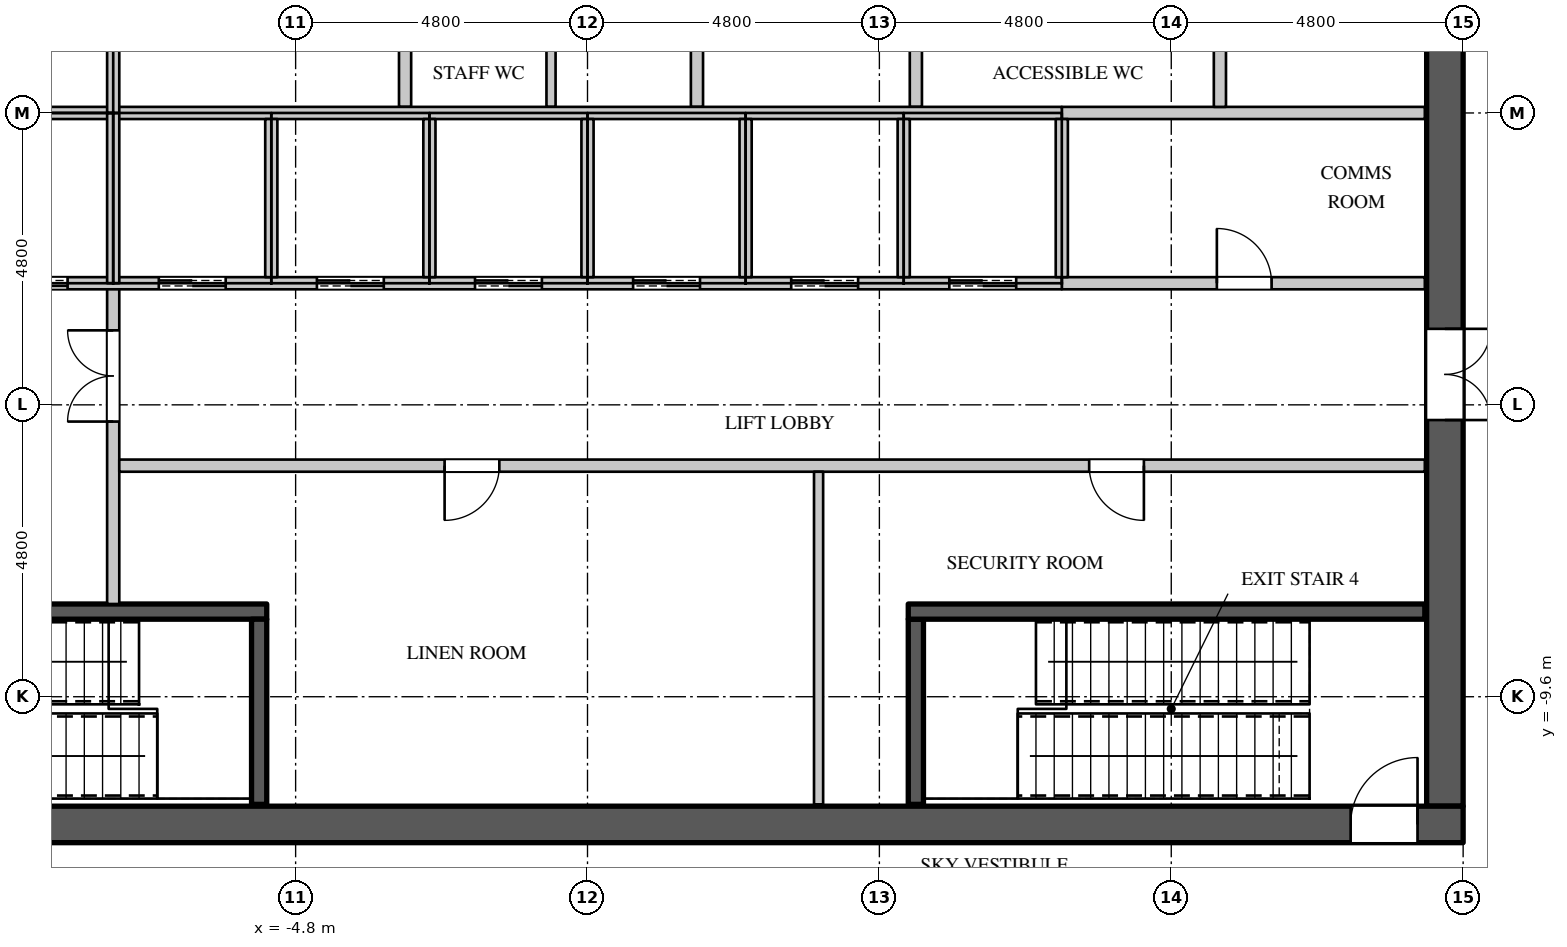
"""IFC4 building model, lengths in metres.
Left out: names, types, materials, properties, quantities, classifications, styles, units other than length and angle.
Written with IfcOpenShell. Run it as: python <this file> out.ifc"""

import sys

from ifc_helpers import new_model, si_unit, direction, frame, frame_2d, origin, place, context, subcontext, project, spatial, rectangle, extrude, element, fill, save


model = new_model("IFC4")
c1 = context("Model", 3, precision=1e-05, world=origin(), true_north=direction((0.0, 1.0)))
c2 = subcontext(c1, "Body", "Model", "MODEL_VIEW")
j1 = project(units=[si_unit("LENGTHUNIT", "METRE"), si_unit("PLANEANGLEUNIT", "RADIAN")], contexts=[c1])
p1 = place(None, origin())
s1 = spatial("IfcSite", under=j1, at=p1, CompositionType="ELEMENT")
p2 = place(p1, origin())
s2 = spatial("IfcBuilding", under=s1, at=p2, CompositionType="ELEMENT")
p3 = place(p2, frame((0.0, 0.0, 314.7)))
s3 = spatial("IfcBuildingStorey", under=s2, at=p3, CompositionType="ELEMENT", Elevation=314.7)
p4 = place(p3, frame((-14.4, -11.7, 0.0), z_axis=(0.0, 0.0, 1.0), x_axis=(1.0, 0.0, 0.0)))
e1 = element("IfcWall", 1, at=p4, inside=s3, PredefinedType="SHEAR", context=c2, shape_type="SweptSolid", body=[
    extrude(rectangle(XDim=28.8, YDim=0.6, at=frame_2d((14.4, 0.0))), origin(), (0.0, 0.0, 1.0), 5.4),
])
p5 = place(p4, frame((0.75, 0.0, 0.0)))
e2 = element("IfcOpeningElement", 2, at=p5, cuts=e1, PredefinedType="OPENING", context=c2, shape_type="SweptSolid", body=[
    extrude(rectangle(XDim=1.1, YDim=2.2, at=frame_2d((0.55, 1.1))), frame((0.0, 0.31, 0.0), z_axis=(0.0, -1.0, 0.0), x_axis=(1.0, 0.0, 0.0)), (0.0, 0.0, 1.0), 0.62),
])
p6 = place(p4, frame((26.95, 0.0, 0.0)))
e3 = element("IfcOpeningElement", 3, at=p6, cuts=e1, PredefinedType="OPENING", context=c2, shape_type="SweptSolid", body=[
    extrude(rectangle(XDim=1.1, YDim=2.2, at=frame_2d((0.55, 1.1))), frame((0.0, 0.31, 0.0), z_axis=(0.0, -1.0, 0.0), x_axis=(1.0, 0.0, 0.0)), (0.0, 0.0, 1.0), 0.62),
])
p7 = place(p3, frame((14.1, -11.4, 0.0), z_axis=(0.0, 0.0, 1.0), x_axis=(0.0, 1.0, 0.0)))
e4 = element("IfcWall", 4, at=p7, inside=s3, PredefinedType="SHEAR", context=c2, shape_type="SweptSolid", body=[
    extrude(rectangle(XDim=22.8, YDim=0.6, at=frame_2d((11.4, 0.0))), origin(), (0.0, 0.0, 1.0), 5.4),
])
p8 = place(p7, frame((6.35, 0.0, 0.0)))
e5 = element("IfcOpeningElement", 5, at=p8, cuts=e4, PredefinedType="OPENING", context=c2, shape_type="SweptSolid", body=[
    extrude(rectangle(XDim=1.5, YDim=2.4, at=frame_2d((0.75, 1.2))), frame((0.0, 0.31, 0.0), z_axis=(0.0, -1.0, 0.0), x_axis=(1.0, 0.0, 0.0)), (0.0, 0.0, 1.0), 0.62),
])
p9 = place(p3, frame((-7.8, -8.075, 0.0), z_axis=(0.0, 0.0, 1.0), x_axis=(0.0, 1.0, 0.0)))
e6 = element("IfcWall", 6, at=p9, inside=s3, PredefinedType="PARTITIONING", context=c2, shape_type="SweptSolid", body=[
    extrude(rectangle(XDim=5.275, YDim=0.2, at=frame_2d((2.637, 0.0))), origin(), (0.0, 0.0, 1.0), 5.1),
])
p10 = place(p9, frame((3.0, 0.0, 0.0)))
e7 = element("IfcOpeningElement", 7, at=p10, cuts=e6, PredefinedType="OPENING", context=c2, shape_type="SweptSolid", body=[
    extrude(rectangle(XDim=1.5, YDim=2.4, at=frame_2d((0.75, 1.2))), frame((0.0, 0.11, 0.0), z_axis=(0.0, -1.0, 0.0), x_axis=(1.0, 0.0, 0.0)), (0.0, 0.0, 1.0), 0.22),
])
p11 = place(p3, frame((-7.7, -5.8, 0.0), z_axis=(0.0, 0.0, 1.0), x_axis=(1.0, 0.0, 0.0)))
e8 = element("IfcWall", 8, at=p11, inside=s3, PredefinedType="PARTITIONING", context=c2, shape_type="SweptSolid", body=[
    extrude(rectangle(XDim=21.47, YDim=0.2, at=frame_2d((10.735, 0.0))), origin(), (0.0, 0.0, 1.0), 5.1),
])
p12 = place(p11, frame((5.35, 0.0, 0.0)))
e9 = element("IfcOpeningElement", 9, at=p12, cuts=e8, PredefinedType="OPENING", context=c2, shape_type="SweptSolid", body=[
    extrude(rectangle(XDim=0.9, YDim=2.2, at=frame_2d((0.45, 1.1))), frame((0.0, 0.11, 0.0), z_axis=(0.0, -1.0, 0.0), x_axis=(1.0, 0.0, 0.0)), (0.0, 0.0, 1.0), 0.22),
])
p13 = place(p11, frame((15.95, 0.0, 0.0)))
e10 = element("IfcOpeningElement", 10, at=p13, cuts=e8, PredefinedType="OPENING", context=c2, shape_type="SweptSolid", body=[
    extrude(rectangle(XDim=0.9, YDim=2.2, at=frame_2d((0.45, 1.1))), frame((0.0, 0.11, 0.0), z_axis=(0.0, -1.0, 0.0), x_axis=(1.0, 0.0, 0.0)), (0.0, 0.0, 1.0), 0.22),
])
p14 = place(p3, frame((-0.6, 0.1, 0.0), z_axis=(0.0, 0.0, 1.0), x_axis=(0.0, 1.0, 0.0)))
e11 = element("IfcWall", 11, at=p14, inside=s3, PredefinedType="PARTITIONING", context=c2, shape_type="SweptSolid", body=[
    extrude(rectangle(XDim=2.6, YDim=0.15, at=frame_2d((1.3, 0.0))), origin(), (0.0, 0.0, 1.0), 5.1),
])
p15 = place(p3, frame((3.8, -11.37, 0.0), z_axis=(0.0, 0.0, 1.0), x_axis=(0.0, 1.0, 0.0)))
e12 = element("IfcWall", 12, at=p15, inside=s3, PredefinedType="PARTITIONING", context=c2, shape_type="SweptSolid", body=[
    extrude(rectangle(XDim=5.47, YDim=0.15, at=frame_2d((2.735, 0.0))), origin(), (0.0, 0.0, 1.0), 5.1),
])
for number, where, z_axis, x_axis in (
    (13, (-3.0, 0.1, 0.0), (0.0, 0.0, 1.0), (0.0, 1.0, 0.0)),
    (14, (1.8, 0.1, 0.0), (0.0, 0.0, 1.0), (0.0, 1.0, 0.0)),
    (15, (5.4, 0.1, 0.0), (0.0, 0.0, 1.0), (0.0, 1.0, 0.0)),
):
    element("IfcWall", number, at=place(p3, frame(where, z_axis=z_axis, x_axis=x_axis)), inside=s3, PredefinedType="PARTITIONING", context=c2, shape_type="SweptSolid", body=[
        extrude(rectangle(XDim=2.6, YDim=0.2, at=frame_2d((1.3, 0.0))), origin(), (0.0, 0.0, 1.0), 5.1),
    ])
p16 = place(p3, frame((7.8, -2.8, 0.0), z_axis=(0.0, 0.0, 1.0), x_axis=(1.0, 0.0, 0.0)))
e16 = element("IfcWall", 16, at=p16, inside=s3, PredefinedType="PARTITIONING", context=c2, shape_type="SweptSolid", body=[
    extrude(rectangle(XDim=5.97, YDim=0.2, at=frame_2d((2.985, 0.0))), origin(), (0.0, 0.0, 1.0), 5.1),
])
p17 = place(p16, frame((2.55, 0.0, 0.0)))
e17 = element("IfcOpeningElement", 17, at=p17, cuts=e16, PredefinedType="OPENING", context=c2, shape_type="SweptSolid", body=[
    extrude(rectangle(XDim=0.9, YDim=2.2, at=frame_2d((0.45, 1.1))), frame((0.0, 0.11, 0.0), z_axis=(0.0, -1.0, 0.0), x_axis=(1.0, 0.0, 0.0)), (0.0, 0.0, 1.0), 0.22),
])
p18 = place(p3, frame((7.8, 0.0, 0.0), z_axis=(0.0, 0.0, 1.0), x_axis=(1.0, 0.0, 0.0)))
e18 = element("IfcWall", 18, at=p18, inside=s3, PredefinedType="PARTITIONING", context=c2, shape_type="SweptSolid", body=[
    extrude(rectangle(XDim=5.97, YDim=0.2, at=frame_2d((2.985, 0.0))), origin(), (0.0, 0.0, 1.0), 5.1),
])
p19 = place(p3, frame((10.4, 0.1, 0.0), z_axis=(0.0, 0.0, 1.0), x_axis=(0.0, 1.0, 0.0)))
e19 = element("IfcWall", 19, at=p19, inside=s3, PredefinedType="PARTITIONING", context=c2, shape_type="SweptSolid", body=[
    extrude(rectangle(XDim=2.6, YDim=0.2, at=frame_2d((1.3, 0.0))), origin(), (0.0, 0.0, 1.0), 5.1),
])
p20 = place(p3, frame((-13.77, 0.0, 0.0), z_axis=(0.0, 0.0, 1.0), x_axis=(1.0, 0.0, 0.0)))
e20 = element("IfcWall", 20, at=p20, inside=s3, PredefinedType="PARTITIONING", context=c2, shape_type="SweptSolid", body=[
    extrude(rectangle(XDim=21.57, YDim=0.2, at=frame_2d((10.785, 0.0))), origin(), (0.0, 0.0, 1.0), 5.1),
])
p21 = place(p3, frame((-10.4, -2.8, 0.0), z_axis=(0.0, 0.0, 1.0), x_axis=(1.0, 0.0, 0.0)))
e21 = element("IfcWall", 21, at=p21, inside=s3, PredefinedType="PARTITIONING", context=c2, shape_type="SweptSolid", body=[
    extrude(rectangle(XDim=18.2, YDim=0.2, at=frame_2d((9.1, 0.0))), origin(), (0.0, 0.0, 1.0), 5.1),
])
p22 = place(p21, frame((0.75, 0.0, 0.0)))
e22 = element("IfcOpeningElement", 22, at=p22, cuts=e21, PredefinedType="OPENING", context=c2, shape_type="SweptSolid", body=[
    extrude(rectangle(XDim=1.1, YDim=2.2, at=frame_2d((0.55, 1.1))), frame((0.0, 0.11, 0.0), z_axis=(0.0, -1.0, 0.0), x_axis=(1.0, 0.0, 0.0)), (0.0, 0.0, 1.0), 0.22),
])
p23 = place(p21, frame((3.35, 0.0, 0.0)))
e23 = element("IfcOpeningElement", 23, at=p23, cuts=e21, PredefinedType="OPENING", context=c2, shape_type="SweptSolid", body=[
    extrude(rectangle(XDim=1.1, YDim=2.2, at=frame_2d((0.55, 1.1))), frame((0.0, 0.11, 0.0), z_axis=(0.0, -1.0, 0.0), x_axis=(1.0, 0.0, 0.0)), (0.0, 0.0, 1.0), 0.22),
])
p24 = place(p21, frame((5.95, 0.0, 0.0)))
e24 = element("IfcOpeningElement", 24, at=p24, cuts=e21, PredefinedType="OPENING", context=c2, shape_type="SweptSolid", body=[
    extrude(rectangle(XDim=1.1, YDim=2.2, at=frame_2d((0.55, 1.1))), frame((0.0, 0.11, 0.0), z_axis=(0.0, -1.0, 0.0), x_axis=(1.0, 0.0, 0.0)), (0.0, 0.0, 1.0), 0.22),
])
p25 = place(p21, frame((8.55, 0.0, 0.0)))
e25 = element("IfcOpeningElement", 25, at=p25, cuts=e21, PredefinedType="OPENING", context=c2, shape_type="SweptSolid", body=[
    extrude(rectangle(XDim=1.1, YDim=2.2, at=frame_2d((0.55, 1.1))), frame((0.0, 0.11, 0.0), z_axis=(0.0, -1.0, 0.0), x_axis=(1.0, 0.0, 0.0)), (0.0, 0.0, 1.0), 0.22),
])
p26 = place(p21, frame((11.15, 0.0, 0.0)))
e26 = element("IfcOpeningElement", 26, at=p26, cuts=e21, PredefinedType="OPENING", context=c2, shape_type="SweptSolid", body=[
    extrude(rectangle(XDim=1.1, YDim=2.2, at=frame_2d((0.55, 1.1))), frame((0.0, 0.11, 0.0), z_axis=(0.0, -1.0, 0.0), x_axis=(1.0, 0.0, 0.0)), (0.0, 0.0, 1.0), 0.22),
])
p27 = place(p21, frame((13.75, 0.0, 0.0)))
e27 = element("IfcOpeningElement", 27, at=p27, cuts=e21, PredefinedType="OPENING", context=c2, shape_type="SweptSolid", body=[
    extrude(rectangle(XDim=1.1, YDim=2.2, at=frame_2d((0.55, 1.1))), frame((0.0, 0.11, 0.0), z_axis=(0.0, -1.0, 0.0), x_axis=(1.0, 0.0, 0.0)), (0.0, 0.0, 1.0), 0.22),
])
p28 = place(p21, frame((16.35, 0.0, 0.0)))
e28 = element("IfcOpeningElement", 28, at=p28, cuts=e21, PredefinedType="OPENING", context=c2, shape_type="SweptSolid", body=[
    extrude(rectangle(XDim=1.1, YDim=2.2, at=frame_2d((0.55, 1.1))), frame((0.0, 0.11, 0.0), z_axis=(0.0, -1.0, 0.0), x_axis=(1.0, 0.0, 0.0)), (0.0, 0.0, 1.0), 0.22),
])
for number, where, z_axis, x_axis in (
    (29, (-7.8, -2.8, 0.0), (0.0, 0.0, 1.0), (0.0, 1.0, 0.0)),
    (30, (-7.8, 0.0, 0.0), (0.0, 0.0, 1.0), (0.0, 1.0, 0.0)),
):
    element("IfcWall", number, at=place(p3, frame(where, z_axis=z_axis, x_axis=x_axis)), inside=s3, PredefinedType="PARTITIONING", context=c2, shape_type="SweptSolid", body=[
        extrude(rectangle(XDim=2.8, YDim=0.2, at=frame_2d((1.4, 0.0))), origin(), (0.0, 0.0, 1.0), 5.1),
    ])
for number, where, z_axis, x_axis in (
    (31, (-5.2, -2.7, 0.0), (0.0, 0.0, 1.0), (0.0, 1.0, 0.0)),
    (32, (-2.6, -2.7, 0.0), (0.0, 0.0, 1.0), (0.0, 1.0, 0.0)),
    (33, (0.0, -2.7, 0.0), (0.0, 0.0, 1.0), (0.0, 1.0, 0.0)),
    (34, (2.6, -2.7, 0.0), (0.0, 0.0, 1.0), (0.0, 1.0, 0.0)),
    (35, (5.2, -2.7, 0.0), (0.0, 0.0, 1.0), (0.0, 1.0, 0.0)),
    (36, (7.8, -2.7, 0.0), (0.0, 0.0, 1.0), (0.0, 1.0, 0.0)),
):
    element("IfcWall", number, at=place(p3, frame(where, z_axis=z_axis, x_axis=x_axis)), inside=s3, PredefinedType="PARTITIONING", context=c2, shape_type="SweptSolid", body=[
        extrude(rectangle(XDim=2.6, YDim=0.2, at=frame_2d((1.3, 0.0))), origin(), (0.0, 0.0, 1.0), 5.1),
    ])
p29 = place(p3, frame((-13.77, -8.2, 0.0), z_axis=(0.0, 0.0, 1.0), x_axis=(1.0, 0.0, 0.0)))
e37 = element("IfcWall", 37, at=p29, inside=s3, PredefinedType="SHEAR", context=c2, shape_type="SweptSolid", body=[
    extrude(rectangle(XDim=8.495, YDim=0.25, at=frame_2d((4.248, 0.0))), origin(), (0.0, 0.0, 1.0), 5.1),
])
p30 = place(p29, frame((0.15, 0.0, 0.0)))
e38 = element("IfcOpeningElement", 38, at=p30, cuts=e37, PredefinedType="OPENING", context=c2, shape_type="SweptSolid", body=[
    extrude(rectangle(XDim=1.1, YDim=2.2, at=frame_2d((0.55, 1.1))), frame((0.0, 0.135, 0.0), z_axis=(0.0, -1.0, 0.0), x_axis=(1.0, 0.0, 0.0)), (0.0, 0.0, 1.0), 0.27),
])
for number, where, z_axis, x_axis in (
    (39, (-5.4, -11.37, 0.0), (0.0, 0.0, 1.0), (0.0, 1.0, 0.0)),
    (40, (5.4, -11.37, 0.0), (0.0, 0.0, 1.0), (0.0, 1.0, 0.0)),
):
    element("IfcWall", number, at=place(p3, frame(where, z_axis=z_axis, x_axis=x_axis)), inside=s3, PredefinedType="SHEAR", context=c2, shape_type="SweptSolid", body=[
        extrude(rectangle(XDim=3.045, YDim=0.25, at=frame_2d((1.522, 0.0))), origin(), (0.0, 0.0, 1.0), 5.1),
    ])
p31 = place(p3, frame((5.275, -8.2, 0.0), z_axis=(0.0, 0.0, 1.0), x_axis=(1.0, 0.0, 0.0)))
e41 = element("IfcWall", 41, at=p31, inside=s3, PredefinedType="SHEAR", context=c2, shape_type="SweptSolid", body=[
    extrude(rectangle(XDim=8.495, YDim=0.25, at=frame_2d((4.248, 0.0))), origin(), (0.0, 0.0, 1.0), 5.1),
])
p32 = place(p17, origin())
e42 = element("IfcDoor", 42, at=p32, inside=s3, OperationType="SINGLE_SWING_LEFT", PredefinedType="DOOR", context=c2, shape_type="SweptSolid", body=[
    extrude(rectangle(XDim=0.9, YDim=2.2, at=frame_2d((0.45, 1.1))), frame((0.0, 0.025, 0.0), z_axis=(0.0, -1.0, 0.0), x_axis=(1.0, 0.0, 0.0)), (0.0, 0.0, 1.0), 0.05),
])
fill(e17, e42)
p33 = place(p12, origin())
e43 = element("IfcDoor", 43, at=p33, inside=s3, OperationType="SINGLE_SWING_RIGHT", PredefinedType="DOOR", context=c2, shape_type="SweptSolid", body=[
    extrude(rectangle(XDim=0.9, YDim=2.2, at=frame_2d((0.45, 1.1))), frame((0.0, 0.025, 0.0), z_axis=(0.0, -1.0, 0.0), x_axis=(1.0, 0.0, 0.0)), (0.0, 0.0, 1.0), 0.05),
])
fill(e9, e43)
p34 = place(p13, origin())
e44 = element("IfcDoor", 44, at=p34, inside=s3, OperationType="SINGLE_SWING_LEFT", PredefinedType="DOOR", context=c2, shape_type="SweptSolid", body=[
    extrude(rectangle(XDim=0.9, YDim=2.2, at=frame_2d((0.45, 1.1))), frame((0.0, 0.025, 0.0), z_axis=(0.0, -1.0, 0.0), x_axis=(1.0, 0.0, 0.0)), (0.0, 0.0, 1.0), 0.05),
])
fill(e10, e44)
p35 = place(p22, origin())
e45 = element("IfcDoor", 45, at=p35, inside=s3, OperationType="DOUBLE_DOOR_SLIDING", PredefinedType="DOOR", context=c2, shape_type="SweptSolid", body=[
    extrude(rectangle(XDim=1.1, YDim=2.2, at=frame_2d((0.55, 1.1))), frame((0.0, 0.025, 0.0), z_axis=(0.0, -1.0, 0.0), x_axis=(1.0, 0.0, 0.0)), (0.0, 0.0, 1.0), 0.05),
])
fill(e22, e45)
p36 = place(p23, origin())
e46 = element("IfcDoor", 46, at=p36, inside=s3, OperationType="DOUBLE_DOOR_SLIDING", PredefinedType="DOOR", context=c2, shape_type="SweptSolid", body=[
    extrude(rectangle(XDim=1.1, YDim=2.2, at=frame_2d((0.55, 1.1))), frame((0.0, 0.025, 0.0), z_axis=(0.0, -1.0, 0.0), x_axis=(1.0, 0.0, 0.0)), (0.0, 0.0, 1.0), 0.05),
])
fill(e23, e46)
p37 = place(p24, origin())
e47 = element("IfcDoor", 47, at=p37, inside=s3, OperationType="DOUBLE_DOOR_SLIDING", PredefinedType="DOOR", context=c2, shape_type="SweptSolid", body=[
    extrude(rectangle(XDim=1.1, YDim=2.2, at=frame_2d((0.55, 1.1))), frame((0.0, 0.025, 0.0), z_axis=(0.0, -1.0, 0.0), x_axis=(1.0, 0.0, 0.0)), (0.0, 0.0, 1.0), 0.05),
])
fill(e24, e47)
p38 = place(p25, origin())
e48 = element("IfcDoor", 48, at=p38, inside=s3, OperationType="DOUBLE_DOOR_SLIDING", PredefinedType="DOOR", context=c2, shape_type="SweptSolid", body=[
    extrude(rectangle(XDim=1.1, YDim=2.2, at=frame_2d((0.55, 1.1))), frame((0.0, 0.025, 0.0), z_axis=(0.0, -1.0, 0.0), x_axis=(1.0, 0.0, 0.0)), (0.0, 0.0, 1.0), 0.05),
])
fill(e25, e48)
p39 = place(p26, origin())
e49 = element("IfcDoor", 49, at=p39, inside=s3, OperationType="DOUBLE_DOOR_SLIDING", PredefinedType="DOOR", context=c2, shape_type="SweptSolid", body=[
    extrude(rectangle(XDim=1.1, YDim=2.2, at=frame_2d((0.55, 1.1))), frame((0.0, 0.025, 0.0), z_axis=(0.0, -1.0, 0.0), x_axis=(1.0, 0.0, 0.0)), (0.0, 0.0, 1.0), 0.05),
])
fill(e26, e49)
p40 = place(p27, origin())
e50 = element("IfcDoor", 50, at=p40, inside=s3, OperationType="DOUBLE_DOOR_SLIDING", PredefinedType="DOOR", context=c2, shape_type="SweptSolid", body=[
    extrude(rectangle(XDim=1.1, YDim=2.2, at=frame_2d((0.55, 1.1))), frame((0.0, 0.025, 0.0), z_axis=(0.0, -1.0, 0.0), x_axis=(1.0, 0.0, 0.0)), (0.0, 0.0, 1.0), 0.05),
])
fill(e27, e50)
p41 = place(p28, origin())
e51 = element("IfcDoor", 51, at=p41, inside=s3, OperationType="DOUBLE_DOOR_SLIDING", PredefinedType="DOOR", context=c2, shape_type="SweptSolid", body=[
    extrude(rectangle(XDim=1.1, YDim=2.2, at=frame_2d((0.55, 1.1))), frame((0.0, 0.025, 0.0), z_axis=(0.0, -1.0, 0.0), x_axis=(1.0, 0.0, 0.0)), (0.0, 0.0, 1.0), 0.05),
])
fill(e28, e51)
p42 = place(p10, origin())
e52 = element("IfcDoor", 52, at=p42, inside=s3, OperationType="DOUBLE_DOOR_SINGLE_SWING", PredefinedType="DOOR", context=c2, shape_type="SweptSolid", body=[
    extrude(rectangle(XDim=1.5, YDim=2.4, at=frame_2d((0.75, 1.2))), frame((0.0, 0.025, 0.0), z_axis=(0.0, -1.0, 0.0), x_axis=(1.0, 0.0, 0.0)), (0.0, 0.0, 1.0), 0.05),
])
fill(e7, e52)
p43 = place(p8, origin())
e53 = element("IfcDoor", 53, at=p43, inside=s3, OperationType="DOUBLE_DOOR_SINGLE_SWING", PredefinedType="DOOR", context=c2, shape_type="SweptSolid", body=[
    extrude(rectangle(XDim=1.5, YDim=2.4, at=frame_2d((0.75, 1.2))), frame((0.0, -0.245, 0.0), z_axis=(0.0, -1.0, 0.0), x_axis=(1.0, 0.0, 0.0)), (0.0, 0.0, 1.0), 0.05),
])
fill(e5, e53)
p44 = place(p6, origin())
e54 = element("IfcDoor", 54, at=p44, inside=s3, OperationType="SINGLE_SWING_RIGHT", PredefinedType="DOOR", context=c2, shape_type="SweptSolid", body=[
    extrude(rectangle(XDim=1.1, YDim=2.2, at=frame_2d((0.55, 1.1))), frame((0.0, 0.295, 0.0), z_axis=(0.0, -1.0, 0.0), x_axis=(1.0, 0.0, 0.0)), (0.0, 0.0, 1.0), 0.05),
])
fill(e3, e54)
save(model, sys.argv[1])
